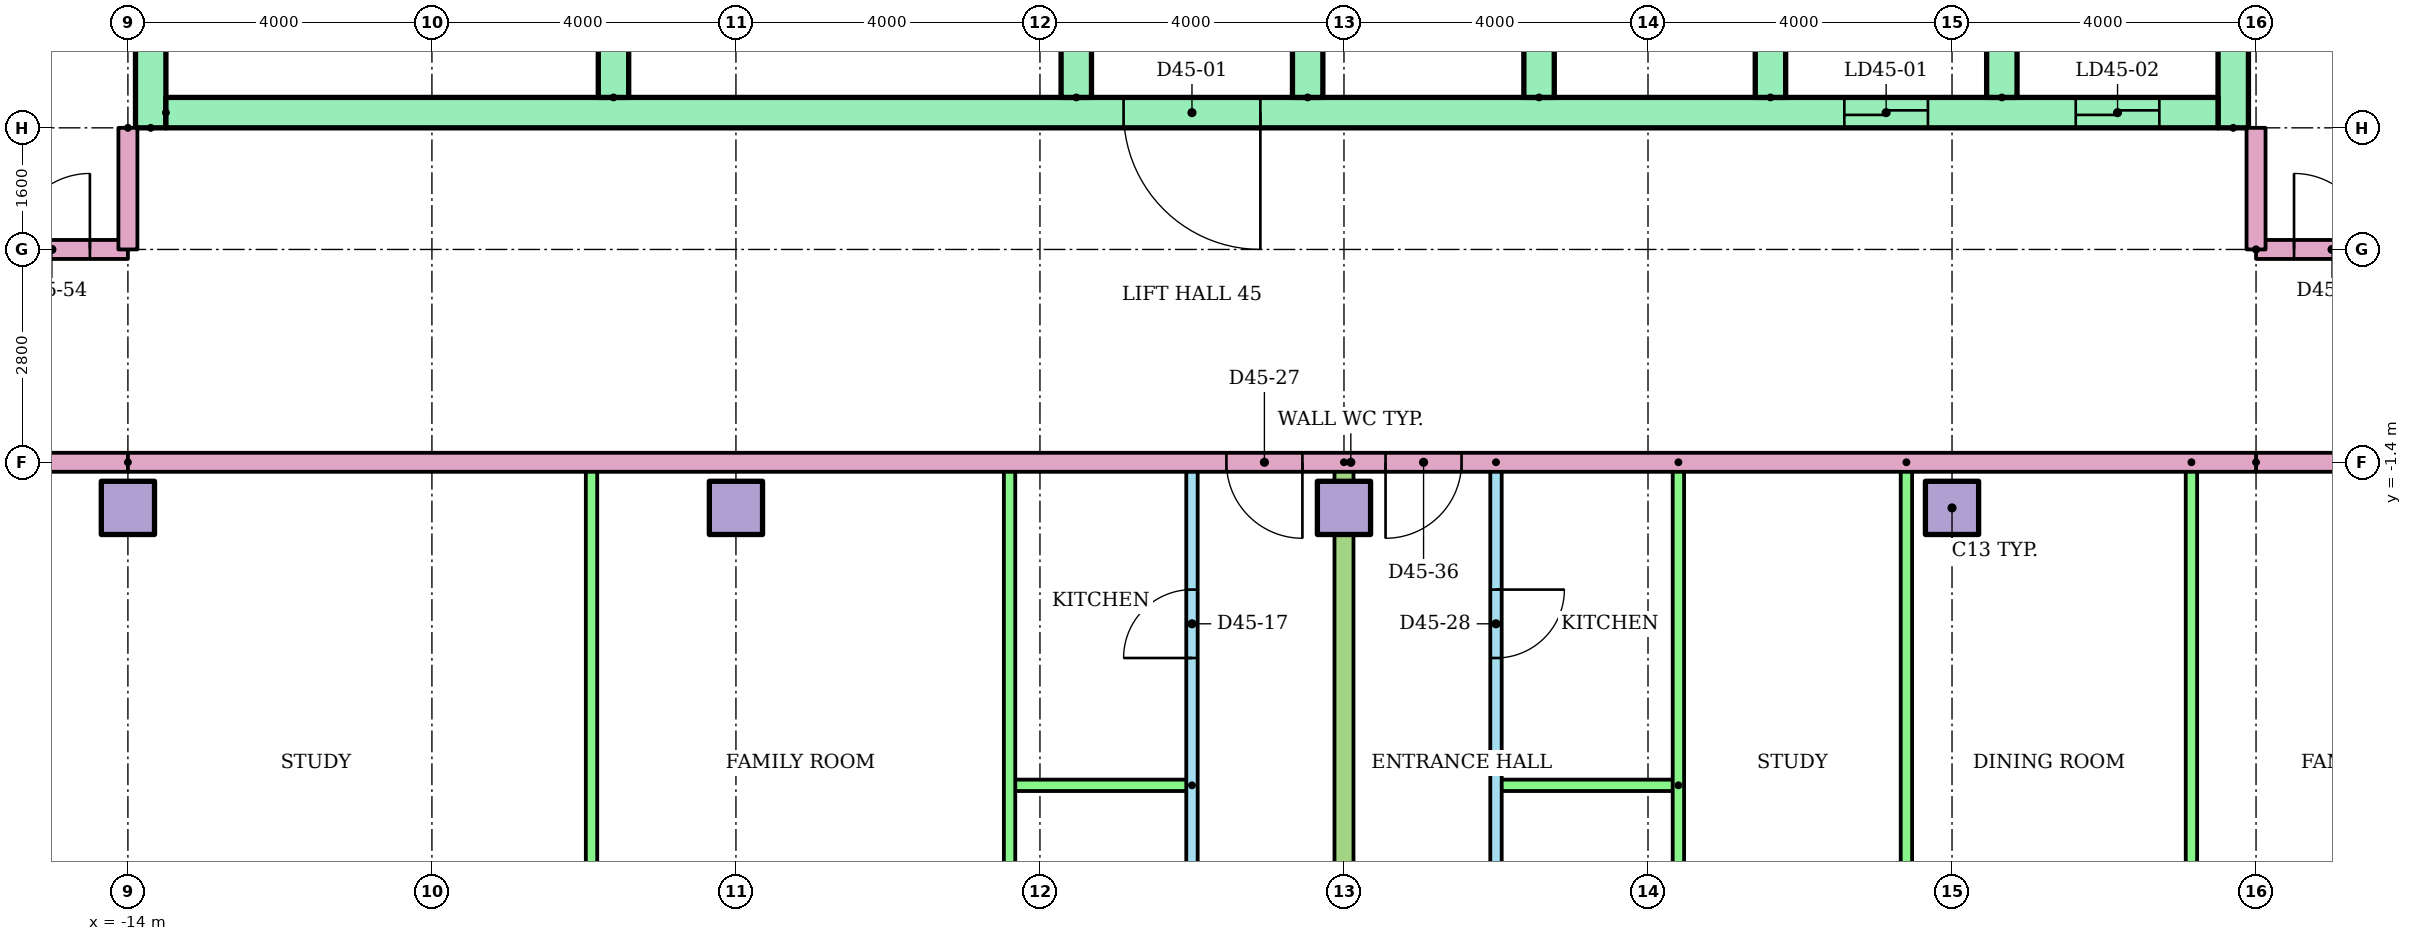
"""IFC4 building model, lengths in metres.
Left out: names, types, materials, properties, quantities, classifications, styles, units other than length and angle.
Written with IfcOpenShell. Run it as: python <this file> out.ifc"""

import sys

from ifc_helpers import new_model, si_unit, direction, frame, frame_2d, origin, origin_2d, place, context, subcontext, project, spatial, rectangle, extrude, element, fill, save


model = new_model("IFC4")
c1 = context("Model", 3, precision=1e-05, world=origin(), true_north=direction((0.0, 1.0)))
c2 = subcontext(c1, "Body", "Model", "MODEL_VIEW")
j1 = project(units=[si_unit("LENGTHUNIT", "METRE"), si_unit("PLANEANGLEUNIT", "RADIAN")], contexts=[c1])
p1 = place(None, origin())
s1 = spatial("IfcSite", under=j1, at=p1, CompositionType="ELEMENT")
p2 = place(p1, origin())
s2 = spatial("IfcBuilding", under=s1, at=p2, CompositionType="ELEMENT")
p3 = place(p2, frame((0.0, 0.0, 174.9)))
s3 = spatial("IfcBuildingStorey", under=s2, at=p3, CompositionType="ELEMENT", Elevation=174.9)
for number, where in (
    (1, (-14.0, -2.0, 0.0)),
    (2, (-6.0, -2.0, 0.0)),
    (3, (2.0, -2.0, 0.0)),
    (4, (10.0, -2.0, 0.0)),
):
    element("IfcColumn", number, at=place(p3, frame(where)), inside=s3, PredefinedType="COLUMN", context=c2, shape_type="SweptSolid", body=[
        extrude(rectangle(XDim=0.7, YDim=0.7, at=origin_2d()), origin(), (0.0, 0.0, 1.0), 3.2),
    ])
for number, where, z_axis, x_axis in (
    (5, (-13.7, 3.0, 0.0), (0.0, 0.0, 1.0), (0.0, 1.0, 0.0)),
    (6, (13.7, 3.0, 0.0), (0.0, 0.0, 1.0), (0.0, 1.0, 0.0)),
):
    element("IfcWall", number, at=place(p3, frame(where, z_axis=z_axis, x_axis=x_axis)), inside=s3, PredefinedType="SHEAR", context=c2, shape_type="SweptSolid", body=[
        extrude(rectangle(XDim=17.0, YDim=0.4, at=frame_2d((8.5, 0.0))), origin(), (0.0, 0.0, 1.0), 2.92),
    ])
p4 = place(p3, frame((-13.5, 3.2, 0.0)))
e7 = element("IfcWall", 7, at=p4, inside=s3, PredefinedType="SHEAR", context=c2, shape_type="SweptSolid", body=[
    extrude(rectangle(XDim=27.0, YDim=0.4, at=frame_2d((13.5, 0.0))), origin(), (0.0, 0.0, 1.0), 2.92),
])
p5 = place(p4, frame((22.083, 0.0, 0.0)))
e8 = element("IfcOpeningElement", 8, at=p5, cuts=e7, PredefinedType="OPENING", context=c2, shape_type="SweptSolid", body=[
    extrude(rectangle(XDim=1.1, YDim=2.1, at=frame_2d((0.55, 1.05))), frame((0.0, 0.21, 0.0), z_axis=(0.0, -1.0, 0.0), x_axis=(1.0, 0.0, 0.0)), (0.0, 0.0, 1.0), 0.42),
])
p6 = place(p4, frame((25.128, 0.0, 0.0)))
e9 = element("IfcOpeningElement", 9, at=p6, cuts=e7, PredefinedType="OPENING", context=c2, shape_type="SweptSolid", body=[
    extrude(rectangle(XDim=1.1, YDim=2.1, at=frame_2d((0.55, 1.05))), frame((0.0, 0.21, 0.0), z_axis=(0.0, -1.0, 0.0), x_axis=(1.0, 0.0, 0.0)), (0.0, 0.0, 1.0), 0.42),
])
p7 = place(p4, frame((12.6, 0.0, 0.0)))
e10 = element("IfcOpeningElement", 10, at=p7, cuts=e7, PredefinedType="OPENING", context=c2, shape_type="SweptSolid", body=[
    extrude(rectangle(XDim=1.8, YDim=2.1, at=frame_2d((0.9, 1.05))), frame((0.0, 0.21, 0.0), z_axis=(0.0, -1.0, 0.0), x_axis=(1.0, 0.0, 0.0)), (0.0, 0.0, 1.0), 0.42),
])
for number, where, z_axis, x_axis in (
    (11, (-7.611, 3.4, 0.0), (0.0, 0.0, 1.0), (0.0, 1.0, 0.0)),
    (12, (-1.522, 3.4, 0.0), (0.0, 0.0, 1.0), (0.0, 1.0, 0.0)),
    (13, (1.522, 3.4, 0.0), (0.0, 0.0, 1.0), (0.0, 1.0, 0.0)),
    (14, (4.567, 3.4, 0.0), (0.0, 0.0, 1.0), (0.0, 1.0, 0.0)),
    (15, (7.611, 3.4, 0.0), (0.0, 0.0, 1.0), (0.0, 1.0, 0.0)),
    (16, (10.656, 3.4, 0.0), (0.0, 0.0, 1.0), (0.0, 1.0, 0.0)),
):
    element("IfcWall", number, at=place(p3, frame(where, z_axis=z_axis, x_axis=x_axis)), inside=s3, PredefinedType="SHEAR", context=c2, shape_type="SweptSolid", body=[
        extrude(rectangle(XDim=3.0, YDim=0.4, at=frame_2d((1.5, 0.0))), origin(), (0.0, 0.0, 1.0), 2.92),
    ])
p8 = place(p3, frame((0.0, -9.3, 0.0), z_axis=(0.0, 0.0, 1.0), x_axis=(0.0, 1.0, 0.0)))
e17 = element("IfcWall", 17, at=p8, inside=s3, PredefinedType="PARTITIONING", context=c2, shape_type="SweptSolid", body=[
    extrude(rectangle(XDim=7.9, YDim=0.15, at=frame_2d((3.95, 0.0))), origin(), (0.0, 0.0, 1.0), 2.4),
])
p9 = place(p8, frame((5.325, 0.0, 0.0)))
e18 = element("IfcOpeningElement", 18, at=p9, cuts=e17, PredefinedType="OPENING", context=c2, shape_type="SweptSolid", body=[
    extrude(rectangle(XDim=0.9, YDim=2.1, at=frame_2d((0.45, 1.05))), frame((0.0, 0.085, 0.0), z_axis=(0.0, -1.0, 0.0), x_axis=(1.0, 0.0, 0.0)), (0.0, 0.0, 1.0), 0.17),
])
p10 = place(p8, frame((1.425, 0.0, 0.0)))
e19 = element("IfcOpeningElement", 19, at=p10, cuts=e17, PredefinedType="OPENING", context=c2, shape_type="SweptSolid", body=[
    extrude(rectangle(XDim=0.8, YDim=2.1, at=frame_2d((0.4, 1.05))), frame((0.0, 0.085, 0.0), z_axis=(0.0, -1.0, 0.0), x_axis=(1.0, 0.0, 0.0)), (0.0, 0.0, 1.0), 0.17),
])
p11 = place(p3, frame((0.0, -5.65, 0.0), z_axis=(0.0, 0.0, 1.0), x_axis=(-1.0, 0.0, 0.0)))
e20 = element("IfcWall", 20, at=p11, inside=s3, PredefinedType="PARTITIONING", context=c2, shape_type="SweptSolid", body=[
    extrude(rectangle(XDim=2.4, YDim=0.15, at=frame_2d((1.2, 0.0))), origin(), (0.0, 0.0, 1.0), 2.4),
])
for number, where, z_axis, x_axis in (
    (21, (-2.4, -9.3, 0.0), (0.0, 0.0, 1.0), (0.0, 1.0, 0.0)),
    (22, (-7.9, -9.3, 0.0), (0.0, 0.0, 1.0), (0.0, 1.0, 0.0)),
):
    element("IfcWall", number, at=place(p3, frame(where, z_axis=z_axis, x_axis=x_axis)), inside=s3, PredefinedType="PARTITIONING", context=c2, shape_type="SweptSolid", body=[
        extrude(rectangle(XDim=7.9, YDim=0.15, at=frame_2d((3.95, 0.0))), origin(), (0.0, 0.0, 1.0), 2.4),
    ])
p12 = place(p3, frame((4.0, -1.4, 0.0), z_axis=(0.0, 0.0, 1.0), x_axis=(0.0, -1.0, 0.0)))
e23 = element("IfcWall", 23, at=p12, inside=s3, PredefinedType="PARTITIONING", context=c2, shape_type="SweptSolid", body=[
    extrude(rectangle(XDim=7.9, YDim=0.15, at=frame_2d((3.95, 0.0))), origin(), (0.0, 0.0, 1.0), 2.4),
])
p13 = place(p12, frame((1.675, 0.0, 0.0)))
e24 = element("IfcOpeningElement", 24, at=p13, cuts=e23, PredefinedType="OPENING", context=c2, shape_type="SweptSolid", body=[
    extrude(rectangle(XDim=0.9, YDim=2.1, at=frame_2d((0.45, 1.05))), frame((0.0, 0.085, 0.0), z_axis=(0.0, -1.0, 0.0), x_axis=(1.0, 0.0, 0.0)), (0.0, 0.0, 1.0), 0.17),
])
p14 = place(p12, frame((5.675, 0.0, 0.0)))
e25 = element("IfcOpeningElement", 25, at=p14, cuts=e23, PredefinedType="OPENING", context=c2, shape_type="SweptSolid", body=[
    extrude(rectangle(XDim=0.8, YDim=2.1, at=frame_2d((0.4, 1.05))), frame((0.0, 0.085, 0.0), z_axis=(0.0, -1.0, 0.0), x_axis=(1.0, 0.0, 0.0)), (0.0, 0.0, 1.0), 0.17),
])
p15 = place(p3, frame((6.4, -5.65, 0.0), z_axis=(0.0, 0.0, 1.0), x_axis=(-1.0, 0.0, 0.0)))
e26 = element("IfcWall", 26, at=p15, inside=s3, PredefinedType="PARTITIONING", context=c2, shape_type="SweptSolid", body=[
    extrude(rectangle(XDim=2.4, YDim=0.15, at=frame_2d((1.2, 0.0))), origin(), (0.0, 0.0, 1.0), 2.4),
])
for number, where, z_axis, x_axis in (
    (27, (6.4, -1.4, 0.0), (0.0, 0.0, 1.0), (0.0, -1.0, 0.0)),
    (28, (9.4, -1.4, 0.0), (0.0, 0.0, 1.0), (0.0, -1.0, 0.0)),
    (29, (13.15, -1.4, 0.0), (0.0, 0.0, 1.0), (0.0, -1.0, 0.0)),
):
    element("IfcWall", number, at=place(p3, frame(where, z_axis=z_axis, x_axis=x_axis)), inside=s3, PredefinedType="PARTITIONING", context=c2, shape_type="SweptSolid", body=[
        extrude(rectangle(XDim=7.9, YDim=0.15, at=frame_2d((3.95, 0.0))), origin(), (0.0, 0.0, 1.0), 2.4),
    ])
p16 = place(p3, frame((2.0, -1.4, 0.0), z_axis=(0.0, 0.0, 1.0), x_axis=(0.0, -1.0, 0.0)))
e30 = element("IfcWall", 30, at=p16, inside=s3, PredefinedType="PARTITIONING", context=c2, shape_type="SweptSolid", body=[
    extrude(rectangle(XDim=15.01, YDim=0.25, at=frame_2d((7.505, 0.0))), origin(), (0.0, 0.0, 1.0), 2.4),
])
p17 = place(p3, frame((-14.0, -1.4, 0.0), z_axis=(0.0, 0.0, 1.0), x_axis=(-1.0, 0.0, 0.0)))
e31 = element("IfcWall", 31, at=p17, inside=s3, PredefinedType="PARTITIONING", context=c2, shape_type="SweptSolid", body=[
    extrude(rectangle(XDim=10.82, YDim=0.25, at=frame_2d((5.41, 0.0))), origin(), (0.0, 0.0, 1.0), 2.4),
])
p18 = place(p3, frame((29.0, -1.4, 0.0), z_axis=(0.0, 0.0, 1.0), x_axis=(-1.0, 0.0, 0.0)))
e32 = element("IfcWall", 32, at=p18, inside=s3, PredefinedType="PARTITIONING", context=c2, shape_type="SweptSolid", body=[
    extrude(rectangle(XDim=15.0, YDim=0.25, at=frame_2d((7.5, 0.0))), origin(), (0.0, 0.0, 1.0), 2.4),
])
p19 = place(p18, frame((9.453, 0.0, 0.0)))
e33 = element("IfcOpeningElement", 33, at=p19, cuts=e32, PredefinedType="OPENING", context=c2, shape_type="SweptSolid", body=[
    extrude(rectangle(XDim=1.0, YDim=2.1, at=frame_2d((0.5, 1.05))), frame((0.0, 0.135, 0.0), z_axis=(0.0, -1.0, 0.0), x_axis=(1.0, 0.0, 0.0)), (0.0, 0.0, 1.0), 0.27),
])
p20 = place(p18, frame((1.453, 0.0, 0.0)))
e34 = element("IfcOpeningElement", 34, at=p20, cuts=e32, PredefinedType="OPENING", context=c2, shape_type="SweptSolid", body=[
    extrude(rectangle(XDim=1.0, YDim=2.1, at=frame_2d((0.5, 1.05))), frame((0.0, 0.135, 0.0), z_axis=(0.0, -1.0, 0.0), x_axis=(1.0, 0.0, 0.0)), (0.0, 0.0, 1.0), 0.27),
])
p21 = place(p3, frame((-24.82, 1.4, 0.0)))
e35 = element("IfcWall", 35, at=p21, inside=s3, PredefinedType="PARTITIONING", context=c2, shape_type="SweptSolid", body=[
    extrude(rectangle(XDim=10.82, YDim=0.25, at=frame_2d((5.41, 0.0))), origin(), (0.0, 0.0, 1.0), 2.4),
])
p22 = place(p21, frame((9.32, 0.0, 0.0)))
e36 = element("IfcOpeningElement", 36, at=p22, cuts=e35, PredefinedType="OPENING", context=c2, shape_type="SweptSolid", body=[
    extrude(rectangle(XDim=1.0, YDim=2.1, at=frame_2d((0.5, 1.05))), frame((0.0, 0.135, 0.0), z_axis=(0.0, -1.0, 0.0), x_axis=(1.0, 0.0, 0.0)), (0.0, 0.0, 1.0), 0.27),
])
p23 = place(p3, frame((14.0, 1.4, 0.0)))
e37 = element("IfcWall", 37, at=p23, inside=s3, PredefinedType="PARTITIONING", context=c2, shape_type="SweptSolid", body=[
    extrude(rectangle(XDim=15.0, YDim=0.25, at=frame_2d((7.5, 0.0))), origin(), (0.0, 0.0, 1.0), 2.4),
])
p24 = place(p23, frame((0.5, 0.0, 0.0)))
e38 = element("IfcOpeningElement", 38, at=p24, cuts=e37, PredefinedType="OPENING", context=c2, shape_type="SweptSolid", body=[
    extrude(rectangle(XDim=1.0, YDim=2.1, at=frame_2d((0.5, 1.05))), frame((0.0, 0.135, 0.0), z_axis=(0.0, -1.0, 0.0), x_axis=(1.0, 0.0, 0.0)), (0.0, 0.0, 1.0), 0.27),
])
p25 = place(p3, frame((14.0, -1.4, 0.0), z_axis=(0.0, 0.0, 1.0), x_axis=(-1.0, 0.0, 0.0)))
e39 = element("IfcWall", 39, at=p25, inside=s3, PredefinedType="PARTITIONING", context=c2, shape_type="SweptSolid", body=[
    extrude(rectangle(XDim=28.0, YDim=0.25, at=frame_2d((14.0, 0.0))), origin(), (0.0, 0.0, 1.0), 2.4),
])
p26 = place(p25, frame((12.547, 0.0, 0.0)))
e40 = element("IfcOpeningElement", 40, at=p26, cuts=e39, PredefinedType="OPENING", context=c2, shape_type="SweptSolid", body=[
    extrude(rectangle(XDim=1.0, YDim=2.1, at=frame_2d((0.5, 1.05))), frame((0.0, 0.135, 0.0), z_axis=(0.0, -1.0, 0.0), x_axis=(1.0, 0.0, 0.0)), (0.0, 0.0, 1.0), 0.27),
])
p27 = place(p25, frame((10.453, 0.0, 0.0)))
e41 = element("IfcOpeningElement", 41, at=p27, cuts=e39, PredefinedType="OPENING", context=c2, shape_type="SweptSolid", body=[
    extrude(rectangle(XDim=1.0, YDim=2.1, at=frame_2d((0.5, 1.05))), frame((0.0, 0.135, 0.0), z_axis=(0.0, -1.0, 0.0), x_axis=(1.0, 0.0, 0.0)), (0.0, 0.0, 1.0), 0.27),
])
for number, where, z_axis, x_axis in (
    (42, (-14.0, 3.0, 0.0), (0.0, 0.0, 1.0), (0.0, -1.0, 0.0)),
    (43, (14.0, 1.4, 0.0), (0.0, 0.0, 1.0), (0.0, 1.0, 0.0)),
):
    element("IfcWall", number, at=place(p3, frame(where, z_axis=z_axis, x_axis=x_axis)), inside=s3, PredefinedType="PARTITIONING", context=c2, shape_type="SweptSolid", body=[
        extrude(rectangle(XDim=1.6, YDim=0.25, at=frame_2d((0.8, 0.0))), origin(), (0.0, 0.0, 1.0), 2.4),
    ])
p28 = place(p5, origin())
e44 = element("IfcDoor", 44, at=p28, inside=s3, OperationType="SLIDING_TO_LEFT", PredefinedType="DOOR", context=c2, shape_type="SweptSolid", body=[
    extrude(rectangle(XDim=1.1, YDim=2.1, at=frame_2d((0.55, 1.05))), frame((0.0, 0.025, 0.0), z_axis=(0.0, -1.0, 0.0), x_axis=(1.0, 0.0, 0.0)), (0.0, 0.0, 1.0), 0.05),
])
fill(e8, e44)
p29 = place(p6, origin())
e45 = element("IfcDoor", 45, at=p29, inside=s3, OperationType="SLIDING_TO_LEFT", PredefinedType="DOOR", context=c2, shape_type="SweptSolid", body=[
    extrude(rectangle(XDim=1.1, YDim=2.1, at=frame_2d((0.55, 1.05))), frame((0.0, 0.025, 0.0), z_axis=(0.0, -1.0, 0.0), x_axis=(1.0, 0.0, 0.0)), (0.0, 0.0, 1.0), 0.05),
])
fill(e9, e45)
p30 = place(p7, frame((1.8, 0.0, 0.0), z_axis=(0.0, 0.0, 1.0), x_axis=(-1.0, 0.0, 0.0)))
e46 = element("IfcDoor", 46, at=p30, inside=s3, OperationType="DOUBLE_DOOR_SINGLE_SWING", PredefinedType="DOOR", context=c2, shape_type="SweptSolid", body=[
    extrude(rectangle(XDim=1.8, YDim=2.1, at=frame_2d((0.9, 1.05))), frame((0.0, 0.025, 0.0), z_axis=(0.0, -1.0, 0.0), x_axis=(1.0, 0.0, 0.0)), (0.0, 0.0, 1.0), 0.05),
])
fill(e10, e46)
p31 = place(p9, origin())
e47 = element("IfcDoor", 47, at=p31, inside=s3, OperationType="SINGLE_SWING_LEFT", PredefinedType="DOOR", context=c2, shape_type="SweptSolid", body=[
    extrude(rectangle(XDim=0.9, YDim=2.1, at=frame_2d((0.45, 1.05))), frame((0.0, 0.025, 0.0), z_axis=(0.0, -1.0, 0.0), x_axis=(1.0, 0.0, 0.0)), (0.0, 0.0, 1.0), 0.05),
])
fill(e18, e47)
p32 = place(p26, origin())
e48 = element("IfcDoor", 48, at=p32, inside=s3, OperationType="SINGLE_SWING_LEFT", PredefinedType="DOOR", context=c2, shape_type="SweptSolid", body=[
    extrude(rectangle(XDim=1.0, YDim=2.1, at=frame_2d((0.5, 1.05))), frame((0.0, 0.025, 0.0), z_axis=(0.0, -1.0, 0.0), x_axis=(1.0, 0.0, 0.0)), (0.0, 0.0, 1.0), 0.05),
])
fill(e40, e48)
p33 = place(p13, origin())
e49 = element("IfcDoor", 49, at=p33, inside=s3, OperationType="SINGLE_SWING_LEFT", PredefinedType="DOOR", context=c2, shape_type="SweptSolid", body=[
    extrude(rectangle(XDim=0.9, YDim=2.1, at=frame_2d((0.45, 1.05))), frame((0.0, 0.025, 0.0), z_axis=(0.0, -1.0, 0.0), x_axis=(1.0, 0.0, 0.0)), (0.0, 0.0, 1.0), 0.05),
])
fill(e24, e49)
p34 = place(p27, origin())
e50 = element("IfcDoor", 50, at=p34, inside=s3, OperationType="SINGLE_SWING_RIGHT", PredefinedType="DOOR", context=c2, shape_type="SweptSolid", body=[
    extrude(rectangle(XDim=1.0, YDim=2.1, at=frame_2d((0.5, 1.05))), frame((0.0, 0.025, 0.0), z_axis=(0.0, -1.0, 0.0), x_axis=(1.0, 0.0, 0.0)), (0.0, 0.0, 1.0), 0.05),
])
fill(e41, e50)
p35 = place(p22, origin())
e51 = element("IfcDoor", 51, at=p35, inside=s3, OperationType="SINGLE_SWING_RIGHT", PredefinedType="DOOR", context=c2, shape_type="SweptSolid", body=[
    extrude(rectangle(XDim=1.0, YDim=2.1, at=frame_2d((0.5, 1.05))), frame((0.0, 0.025, 0.0), z_axis=(0.0, -1.0, 0.0), x_axis=(1.0, 0.0, 0.0)), (0.0, 0.0, 1.0), 0.05),
])
fill(e36, e51)
p36 = place(p24, origin())
e52 = element("IfcDoor", 52, at=p36, inside=s3, OperationType="SINGLE_SWING_LEFT", PredefinedType="DOOR", context=c2, shape_type="SweptSolid", body=[
    extrude(rectangle(XDim=1.0, YDim=2.1, at=frame_2d((0.5, 1.05))), frame((0.0, 0.025, 0.0), z_axis=(0.0, -1.0, 0.0), x_axis=(1.0, 0.0, 0.0)), (0.0, 0.0, 1.0), 0.05),
])
fill(e38, e52)
save(model, sys.argv[1])
